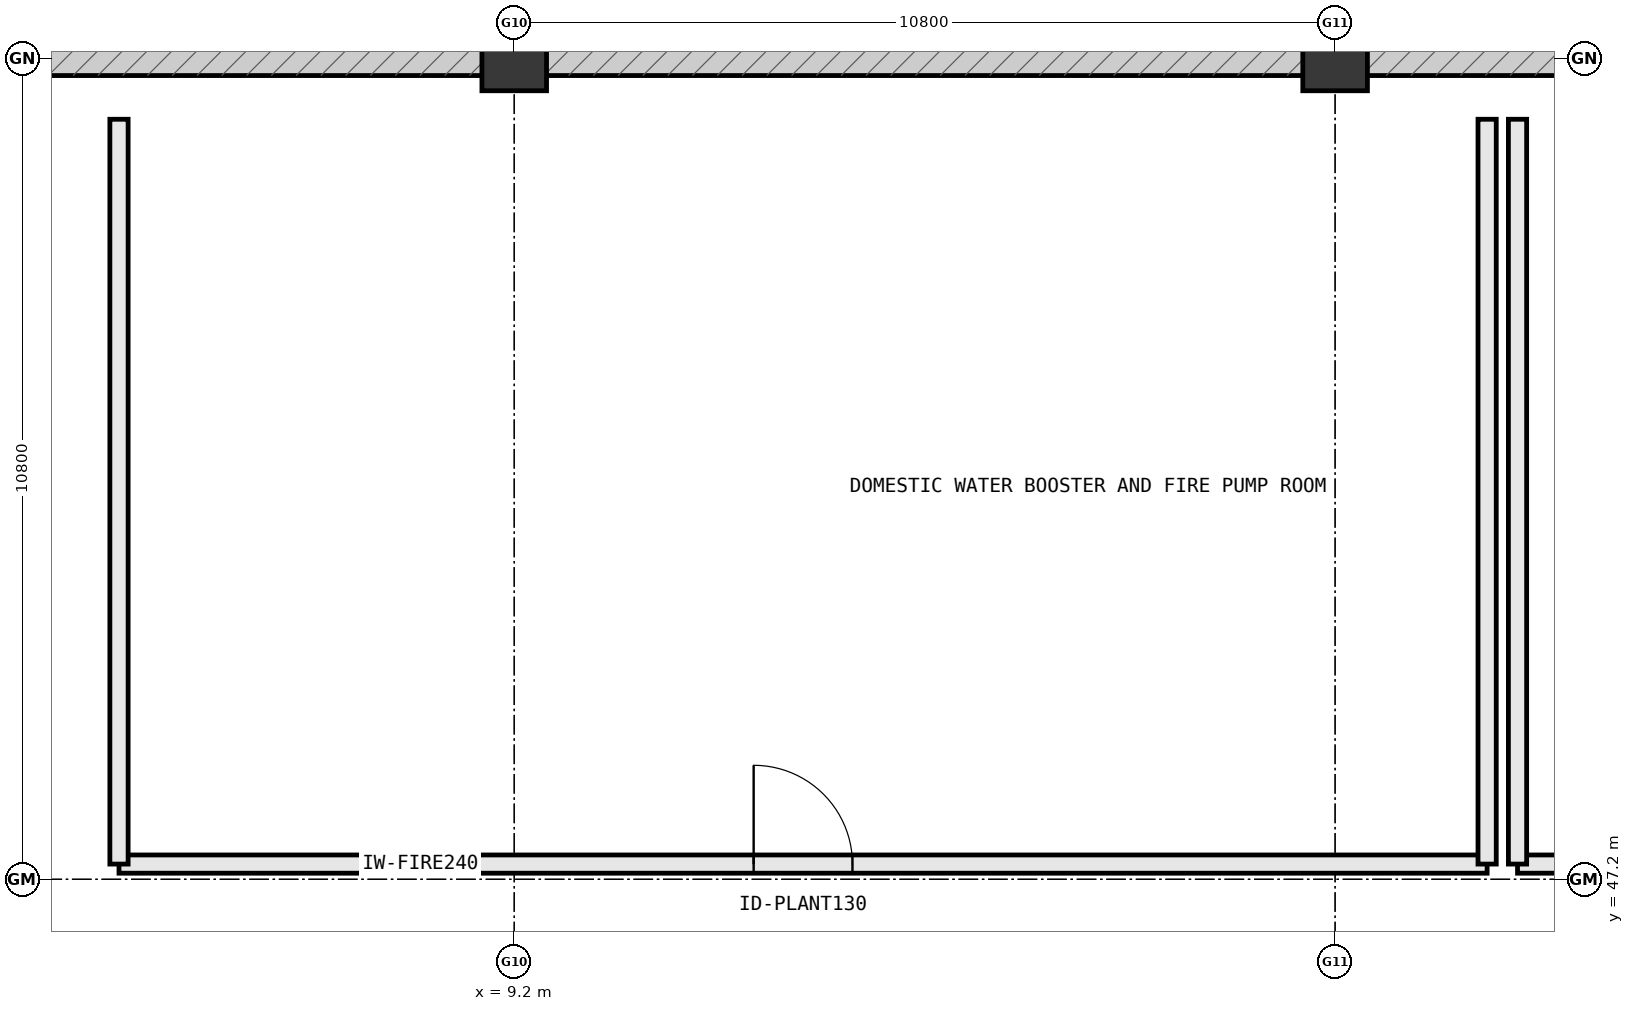
"""IFC4 building model, lengths in metres.
Left out: names, types, materials, properties, quantities, classifications, styles, units other than length and angle.
Written with IfcOpenShell. Run it as: python <this file> out.ifc"""

import sys

from ifc_helpers import new_model, si_unit, direction, frame, frame_2d, origin, origin_2d, place, context, subcontext, project, spatial, rectangle, extrude, element, fill, save


model = new_model("IFC4")
c1 = context("Model", 3, precision=1e-05, world=origin(), true_north=direction((0.0, 1.0)))
c2 = subcontext(c1, "Body", "Model", "MODEL_VIEW")
j1 = project(units=[si_unit("LENGTHUNIT", "METRE"), si_unit("PLANEANGLEUNIT", "RADIAN")], contexts=[c1])
p1 = place(None, origin())
s1 = spatial("IfcSite", under=j1, at=p1, CompositionType="ELEMENT")
p2 = place(p1, origin())
s2 = spatial("IfcBuilding", under=s1, at=p2, CompositionType="ELEMENT")
p3 = place(p2, frame((0.0, 0.0, -4.5)))
s3 = spatial("IfcBuildingStorey", under=s2, at=p3, CompositionType="ELEMENT", Elevation=-4.5)
for number, where, z_axis, x_axis in (
    (1, (9.2, 58.0, 0.0), (0.0, 0.0, 1.0), (1.0, 0.0, 0.0)),
    (2, (20.0, 58.0, 0.0), (0.0, 0.0, 1.0), (1.0, 0.0, 0.0)),
):
    element("IfcColumn", number, at=place(p3, frame(where, z_axis=z_axis, x_axis=x_axis)), inside=s3, PredefinedType="COLUMN", context=c2, shape_type="SweptSolid", body=[
        extrude(rectangle(XDim=0.85, YDim=0.85, at=origin_2d()), origin(), (0.0, 0.0, 1.0), 4.5),
    ])
p4 = place(p3, frame((84.0, 58.0, 0.0), z_axis=(0.0, 0.0, 1.0), x_axis=(-1.0, 0.0, 0.0)))
e3 = element("IfcWall", 3, at=p4, inside=s3, PredefinedType="USERDEFINED", context=c2, shape_type="SweptSolid", body=[
    extrude(rectangle(XDim=131.4, YDim=0.45, at=frame_2d((65.7, 0.0))), origin(), (0.0, 0.0, 1.0), 4.2),
])
p5 = place(p3, frame((4.0, 47.4, 0.0), z_axis=(0.0, 0.0, 1.0), x_axis=(1.0, 0.0, 0.0)))
e4 = element("IfcWall", 4, at=p5, inside=s3, PredefinedType="STANDARD", context=c2, shape_type="SweptSolid", body=[
    extrude(rectangle(XDim=18.0, YDim=0.24, at=frame_2d((9.0, 0.0))), origin(), (0.0, 0.0, 1.0), 4.2),
])
p6 = place(p5, frame((8.35, 0.0, 0.0)))
e5 = element("IfcOpeningElement", 5, at=p6, cuts=e4, PredefinedType="OPENING", context=c2, shape_type="SweptSolid", body=[
    extrude(rectangle(XDim=1.3, YDim=2.2, at=frame_2d((0.65, 1.1))), frame((0.0, 0.132, 0.0), z_axis=(0.0, -1.0, 0.0), x_axis=(1.0, 0.0, 0.0)), (0.0, 0.0, 1.0), 0.264),
])
for number, where, z_axis, x_axis in (
    (6, (22.0, 47.4, 0.0), (0.0, 0.0, 1.0), (0.0, 1.0, 0.0)),
    (7, (4.0, 57.2, 0.0), (0.0, 0.0, 1.0), (0.0, -1.0, 0.0)),
):
    element("IfcWall", number, at=place(p3, frame(where, z_axis=z_axis, x_axis=x_axis)), inside=s3, PredefinedType="STANDARD", context=c2, shape_type="SweptSolid", body=[
        extrude(rectangle(XDim=9.8, YDim=0.24, at=frame_2d((4.9, 0.0))), origin(), (0.0, 0.0, 1.0), 4.2),
    ])
p7 = place(p3, frame((22.4, 47.4, 0.0), z_axis=(0.0, 0.0, 1.0), x_axis=(1.0, 0.0, 0.0)))
e8 = element("IfcWall", 8, at=p7, inside=s3, PredefinedType="STANDARD", context=c2, shape_type="SweptSolid", body=[
    extrude(rectangle(XDim=18.4, YDim=0.24, at=frame_2d((9.2, 0.0))), origin(), (0.0, 0.0, 1.0), 4.2),
])
p8 = place(p7, frame((8.55, 0.0, 0.0)))
e9 = element("IfcOpeningElement", 9, at=p8, cuts=e8, PredefinedType="OPENING", context=c2, shape_type="SweptSolid", body=[
    extrude(rectangle(XDim=1.3, YDim=2.2, at=frame_2d((0.65, 1.1))), frame((0.0, 0.132, 0.0), z_axis=(0.0, -1.0, 0.0), x_axis=(1.0, 0.0, 0.0)), (0.0, 0.0, 1.0), 0.264),
])
p9 = place(p3, frame((22.4, 57.2, 0.0), z_axis=(0.0, 0.0, 1.0), x_axis=(0.0, -1.0, 0.0)))
e10 = element("IfcWall", 10, at=p9, inside=s3, PredefinedType="STANDARD", context=c2, shape_type="SweptSolid", body=[
    extrude(rectangle(XDim=9.8, YDim=0.24, at=frame_2d((4.9, 0.0))), origin(), (0.0, 0.0, 1.0), 4.2),
])
p10 = place(p6, origin())
e11 = element("IfcDoor", 11, at=p10, inside=s3, OperationType="SINGLE_SWING_LEFT", PredefinedType="DOOR", context=c2, shape_type="SweptSolid", body=[
    extrude(rectangle(XDim=1.3, YDim=2.2, at=frame_2d((0.65, 1.1))), frame((0.0, 0.025, 0.0), z_axis=(0.0, -1.0, 0.0), x_axis=(1.0, 0.0, 0.0)), (0.0, 0.0, 1.0), 0.05),
])
fill(e5, e11)
save(model, sys.argv[1])
